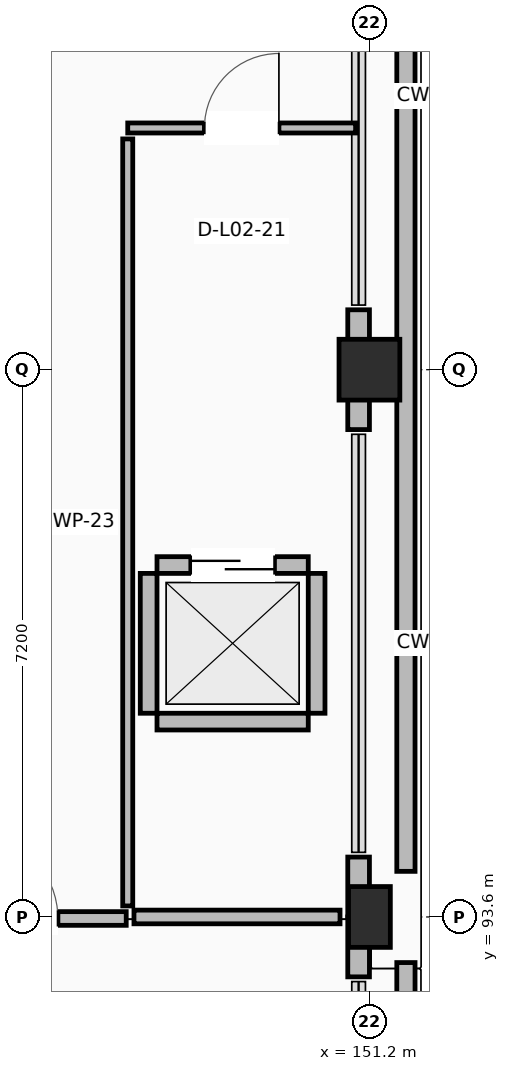
"""IFC4 building model, lengths in metres.
Left out: names, types, materials, properties, quantities, classifications, styles, units other than length and angle.
Written with IfcOpenShell. Run it as: python <this file> out.ifc"""

import sys

from ifc_helpers import new_model, si_unit, direction, frame, frame_2d, origin, origin_2d, place, context, subcontext, project, spatial, rectangle, extrude, element, fill, save


model = new_model("IFC4")
c1 = context("Model", 3, precision=1e-05, world=origin(), true_north=direction((0.0, 1.0)))
c2 = subcontext(c1, "Body", "Model", "MODEL_VIEW")
j1 = project(units=[si_unit("LENGTHUNIT", "METRE"), si_unit("PLANEANGLEUNIT", "RADIAN")], contexts=[c1])
p1 = place(None, origin())
s1 = spatial("IfcSite", under=j1, at=p1, CompositionType="ELEMENT")
p2 = place(p1, origin())
s2 = spatial("IfcBuilding", under=s1, at=p2, CompositionType="ELEMENT")
p3 = place(p2, frame((0.0, 0.0, 9.0)))
s3 = spatial("IfcBuildingStorey", under=s2, at=p3, CompositionType="ELEMENT", Elevation=9.0)
p4 = place(p3, frame((151.2, 93.6, 0.0), z_axis=(0.0, 0.0, 1.0), x_axis=(1.0, 0.0, 0.0)))
e1 = element("IfcColumn", 1, at=p4, inside=s3, PredefinedType="COLUMN", context=c2, shape_type="SweptSolid", body=[
    extrude(rectangle(XDim=0.55, YDim=0.8, at=origin_2d()), origin(), (0.0, 0.0, 1.0), 4.22),
])
p5 = place(p3, frame((151.2, 100.8, 0.0), z_axis=(0.0, 0.0, 1.0), x_axis=(1.0, 0.0, 0.0)))
e2 = element("IfcColumn", 2, at=p5, inside=s3, PredefinedType="COLUMN", context=c2, shape_type="SweptSolid", body=[
    extrude(rectangle(XDim=0.8, YDim=0.8, at=origin_2d()), origin(), (0.0, 0.0, 1.0), 4.22),
])
p6 = place(p3, frame((151.058, 92.812, 0.0), z_axis=(0.0, 0.0, 1.0), x_axis=(0.0, 1.0, 0.0)))
e3 = element("IfcWall", 3, at=p6, inside=s3, PredefinedType="STANDARD", context=c2, shape_type="SweptSolid", body=[
    extrude(rectangle(XDim=0.788, YDim=0.285, at=frame_2d((0.394, 0.0))), origin(), (0.0, 0.0, 1.0), 3.26),
])
p7 = place(p3, frame((151.058, 93.6, 0.0), z_axis=(0.0, 0.0, 1.0), x_axis=(0.0, 1.0, 0.0)))
e4 = element("IfcWall", 4, at=p7, inside=s3, PredefinedType="STANDARD", context=c2, shape_type="SweptSolid", body=[
    extrude(rectangle(XDim=0.788, YDim=0.285, at=frame_2d((0.394, 0.0))), origin(), (0.0, 0.0, 1.0), 3.26),
])
p8 = place(p3, frame((151.058, 100.012, 0.0), z_axis=(0.0, 0.0, 1.0), x_axis=(0.0, 1.0, 0.0)))
e5 = element("IfcWall", 5, at=p8, inside=s3, PredefinedType="STANDARD", context=c2, shape_type="SweptSolid", body=[
    extrude(rectangle(XDim=1.576, YDim=0.285, at=frame_2d((0.788, 0.0))), origin(), (0.0, 0.0, 1.0), 3.26),
])
p9 = place(p3, frame((151.68, 115.56, 0.0), z_axis=(0.0, 0.0, 1.0), x_axis=(0.0, -1.0, 0.0)))
e6 = element("IfcWall", 6, at=p9, inside=s3, PredefinedType="PARAPET", context=c2, shape_type="SweptSolid", body=[
    extrude(rectangle(XDim=21.36, YDim=0.24, at=frame_2d((10.68, 0.0))), origin(), (0.0, 0.0, 1.0), 1.12),
])
p10 = place(p3, frame((151.68, 93.0, 0.0), z_axis=(0.0, 0.0, 1.0), x_axis=(0.0, -1.0, 0.0)))
e7 = element("IfcWall", 7, at=p10, inside=s3, PredefinedType="PARAPET", context=c2, shape_type="SweptSolid", body=[
    extrude(rectangle(XDim=6.96, YDim=0.24, at=frame_2d((3.48, 0.0))), origin(), (0.0, 0.0, 1.0), 1.12),
])
p11 = place(p3, frame((148.405, 96.17, 0.0), z_axis=(0.0, 0.0, 1.0), x_axis=(1.0, 0.0, 0.0)))
e8 = element("IfcWall", 8, at=p11, inside=s3, PredefinedType="STANDARD", context=c2, shape_type="SweptSolid", body=[
    extrude(rectangle(XDim=1.99, YDim=0.22, at=frame_2d((0.995, 0.0))), origin(), (0.0, 0.0, 1.0), 3.26),
])
p12 = place(p3, frame((148.405, 98.23, 0.0), z_axis=(0.0, 0.0, 1.0), x_axis=(1.0, 0.0, 0.0)))
e9 = element("IfcWall", 9, at=p12, inside=s3, PredefinedType="STANDARD", context=c2, shape_type="SweptSolid", body=[
    extrude(rectangle(XDim=1.99, YDim=0.22, at=frame_2d((0.995, 0.0))), origin(), (0.0, 0.0, 1.0), 3.26),
])
p13 = place(p12, frame((0.445, 0.0, 0.0)))
e10 = element("IfcOpeningElement", 10, at=p13, cuts=e9, PredefinedType="OPENING", context=c2, shape_type="SweptSolid", body=[
    extrude(rectangle(XDim=1.1, YDim=2.15, at=frame_2d((0.55, 1.075))), frame((0.0, 0.12, 0.0), z_axis=(0.0, -1.0, 0.0), x_axis=(1.0, 0.0, 0.0)), (0.0, 0.0, 1.0), 0.24),
])
for number, where, z_axis, x_axis in (
    (11, (148.295, 96.28, 0.0), (0.0, 0.0, 1.0), (0.0, 1.0, 0.0)),
    (12, (150.505, 96.28, 0.0), (0.0, 0.0, 1.0), (0.0, 1.0, 0.0)),
):
    element("IfcWall", number, at=place(p3, frame(where, z_axis=z_axis, x_axis=x_axis)), inside=s3, PredefinedType="STANDARD", context=c2, shape_type="SweptSolid", body=[
        extrude(rectangle(XDim=1.84, YDim=0.22, at=frame_2d((0.92, 0.0))), origin(), (0.0, 0.0, 1.0), 3.26),
    ])
p14 = place(p3, frame((145.082, 93.58, 0.0), z_axis=(0.0, 0.0, 1.0), x_axis=(1.0, 0.0, 0.0)))
e13 = element("IfcWall", 13, at=p14, inside=s3, PredefinedType="PARTITIONING", context=c2, shape_type="SweptSolid", body=[
    extrude(rectangle(XDim=2.918, YDim=0.18, at=frame_2d((1.459, 0.0))), origin(), (0.0, 0.0, 1.0), 3.26),
])
p15 = place(p14, frame((0.899, 0.0, 0.0)))
e14 = element("IfcOpeningElement", 14, at=p15, cuts=e13, PredefinedType="OPENING", context=c2, shape_type="SweptSolid", body=[
    extrude(rectangle(XDim=1.12, YDim=2.15, at=frame_2d((0.56, 1.075))), frame((0.0, 0.1, 0.0), z_axis=(0.0, -1.0, 0.0), x_axis=(1.0, 0.0, 0.0)), (0.0, 0.0, 1.0), 0.2),
])
p16 = place(p3, frame((148.102, 93.6, 0.0), z_axis=(0.0, 0.0, 1.0), x_axis=(1.0, 0.0, 0.0)))
e15 = element("IfcWall", 15, at=p16, inside=s3, PredefinedType="PARTITIONING", context=c2, shape_type="SweptSolid", body=[
    extrude(rectangle(XDim=2.711, YDim=0.18, at=frame_2d((1.355, 0.0))), origin(), (0.0, 0.0, 1.0), 3.26),
])
p17 = place(p3, frame((148.02, 103.98, 0.0), z_axis=(0.0, 0.0, 1.0), x_axis=(1.0, 0.0, 0.0)))
e16 = element("IfcWall", 16, at=p17, inside=s3, PredefinedType="PARTITIONING", context=c2, shape_type="SweptSolid", body=[
    extrude(rectangle(XDim=2.998, YDim=0.132, at=frame_2d((1.499, 0.0))), origin(), (0.0, 0.0, 1.0), 3.26),
])
p18 = place(p17, frame((1.009, 0.0, 0.0)))
e17 = element("IfcOpeningElement", 17, at=p18, cuts=e16, PredefinedType="OPENING", context=c2, shape_type="SweptSolid", body=[
    extrude(rectangle(XDim=0.98, YDim=2.1, at=frame_2d((0.49, 1.05))), frame((0.0, 0.076, 0.0), z_axis=(0.0, -1.0, 0.0), x_axis=(1.0, 0.0, 0.0)), (0.0, 0.0, 1.0), 0.152),
])
p19 = place(p3, frame((148.02, 93.745, 0.0), z_axis=(0.0, 0.0, 1.0), x_axis=(0.0, 1.0, 0.0)))
e18 = element("IfcWall", 18, at=p19, inside=s3, PredefinedType="PARTITIONING", context=c2, shape_type="SweptSolid", body=[
    extrude(rectangle(XDim=10.091, YDim=0.132, at=frame_2d((5.045, 0.0))), origin(), (0.0, 0.0, 1.0), 3.26),
])
p20 = place(p13, origin())
e19 = element("IfcDoor", 19, at=p20, inside=s3, OperationType="SLIDING_TO_LEFT", PredefinedType="DOOR", context=c2, shape_type="SweptSolid", body=[
    extrude(rectangle(XDim=1.1, YDim=2.15, at=frame_2d((0.55, 1.075))), frame((0.0, 0.025, 0.0), z_axis=(0.0, -1.0, 0.0), x_axis=(1.0, 0.0, 0.0)), (0.0, 0.0, 1.0), 0.05),
])
fill(e10, e19)
p21 = place(p15, origin())
e20 = element("IfcDoor", 20, at=p21, inside=s3, OperationType="SINGLE_SWING_LEFT", PredefinedType="DOOR", context=c2, shape_type="SweptSolid", body=[
    extrude(rectangle(XDim=1.12, YDim=2.15, at=frame_2d((0.56, 1.075))), frame((0.0, 0.025, 0.0), z_axis=(0.0, -1.0, 0.0), x_axis=(1.0, 0.0, 0.0)), (0.0, 0.0, 1.0), 0.05),
])
fill(e14, e20)
p22 = place(p18, origin())
e21 = element("IfcDoor", 21, at=p22, inside=s3, OperationType="SINGLE_SWING_RIGHT", PredefinedType="DOOR", context=c2, shape_type="SweptSolid", body=[
    extrude(rectangle(XDim=0.98, YDim=2.1, at=frame_2d((0.49, 1.05))), frame((0.0, 0.025, 0.0), z_axis=(0.0, -1.0, 0.0), x_axis=(1.0, 0.0, 0.0)), (0.0, 0.0, 1.0), 0.05),
])
fill(e17, e21)
save(model, sys.argv[1])
